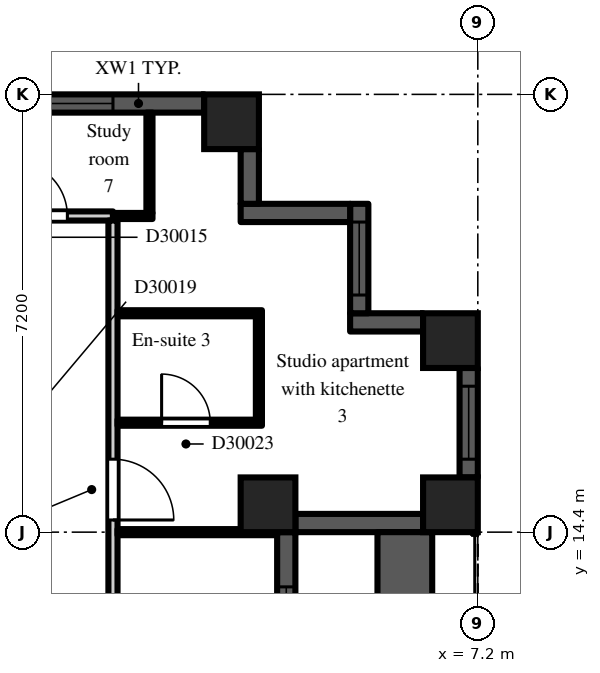
"""IFC4 building model, lengths in metres.
Left out: names, types, materials, properties, quantities, classifications, styles, units other than length and angle.
Written with IfcOpenShell. Run it as: python <this file> out.ifc"""

import sys

from ifc_helpers import new_model, si_unit, direction, frame, frame_2d, origin, origin_2d, place, context, subcontext, project, spatial, rectangle, extrude, element, fill, save


model = new_model("IFC4")
c1 = context("Model", 3, precision=1e-05, world=origin(), true_north=direction((0.0, 1.0)))
c2 = subcontext(c1, "Body", "Model", "MODEL_VIEW")
j1 = project(units=[si_unit("LENGTHUNIT", "METRE"), si_unit("PLANEANGLEUNIT", "RADIAN")], contexts=[c1])
p1 = place(None, origin())
s1 = spatial("IfcSite", under=j1, at=p1, CompositionType="ELEMENT")
p2 = place(p1, origin())
s2 = spatial("IfcBuilding", under=s1, at=p2, CompositionType="ELEMENT")
p3 = place(p2, frame((0.0, 0.0, 207.9)))
s3 = spatial("IfcBuildingStorey", under=s2, at=p3, CompositionType="ELEMENT", Elevation=207.9)
for number, where, z_axis, x_axis in (
    (1, (3.15, 21.15, 0.0), (0.0, 0.0, 1.0), (1.0, 0.0, 0.0)),
    (2, (3.75, 14.85, 0.0), (0.0, 0.0, 1.0), (1.0, 0.0, 0.0)),
    (3, (6.75, 14.85, 0.0), (0.0, 0.0, 1.0), (1.0, 0.0, 0.0)),
    (4, (6.75, 17.55, 0.0), (0.0, 0.0, 1.0), (1.0, 0.0, 0.0)),
):
    element("IfcColumn", number, at=place(p3, frame(where, z_axis=z_axis, x_axis=x_axis)), inside=s3, PredefinedType="COLUMN", context=c2, shape_type="SweptSolid", body=[
        extrude(rectangle(XDim=0.9, YDim=0.9, at=origin_2d()), origin(), (0.0, 0.0, 1.0), 3.0),
    ])
p4 = place(p3, frame((4.05, 7.2, 0.0), z_axis=(0.0, 0.0, 1.0), x_axis=(0.0, 1.0, 0.0)))
e5 = element("IfcWall", 5, at=p4, inside=s3, PredefinedType="SOLIDWALL", context=c2, shape_type="SweptSolid", body=[
    extrude(rectangle(XDim=7.2, YDim=0.3, at=frame_2d((3.6, 0.0))), origin(), (0.0, 0.0, 1.0), 2.3),
])
p5 = place(p4, frame((3.0, 0.0, 0.0)))
e6 = element("IfcOpeningElement", 6, at=p5, cuts=e5, PredefinedType="OPENING", context=c2, shape_type="SweptSolid", body=[
    extrude(rectangle(XDim=1.2, YDim=2.05, at=frame_2d((0.6, 1.025))), frame((0.0, 0.16, 0.0), z_axis=(0.0, -1.0, 0.0), x_axis=(1.0, 0.0, 0.0)), (0.0, 0.0, 1.0), 0.32),
])
p6 = place(p4, frame((0.9, 0.0, 0.2)))
e7 = element("IfcOpeningElement", 7, at=p6, cuts=e5, PredefinedType="OPENING", context=c2, shape_type="SweptSolid", body=[
    extrude(rectangle(XDim=1.8, YDim=1.85, at=frame_2d((0.9, 0.925))), frame((0.0, 0.16, 0.0), z_axis=(0.0, -1.0, 0.0), x_axis=(1.0, 0.0, 0.0)), (0.0, 0.0, 1.0), 0.32),
])
p7 = place(p4, frame((4.5, 0.0, 0.2)))
e8 = element("IfcOpeningElement", 8, at=p7, cuts=e5, PredefinedType="OPENING", context=c2, shape_type="SweptSolid", body=[
    extrude(rectangle(XDim=1.8, YDim=1.85, at=frame_2d((0.9, 0.925))), frame((0.0, 0.16, 0.0), z_axis=(0.0, -1.0, 0.0), x_axis=(1.0, 0.0, 0.0)), (0.0, 0.0, 1.0), 0.32),
])
p8 = place(p3, frame((4.2, 14.55, 0.0), z_axis=(0.0, 0.0, 1.0), x_axis=(1.0, 0.0, 0.0)))
e9 = element("IfcWall", 9, at=p8, inside=s3, PredefinedType="SOLIDWALL", context=c2, shape_type="SweptSolid", body=[
    extrude(rectangle(XDim=2.1, YDim=0.3, at=frame_2d((1.05, 0.0))), origin(), (0.0, 0.0, 1.0), 2.3),
])
p9 = place(p3, frame((7.05, 15.3, 0.0), z_axis=(0.0, 0.0, 1.0), x_axis=(0.0, 1.0, 0.0)))
e10 = element("IfcWall", 10, at=p9, inside=s3, PredefinedType="SOLIDWALL", context=c2, shape_type="SweptSolid", body=[
    extrude(rectangle(XDim=1.8, YDim=0.3, at=frame_2d((0.9, 0.0))), origin(), (0.0, 0.0, 1.0), 2.3),
])
p10 = place(p9, frame((0.3, 0.0, 0.2)))
e11 = element("IfcOpeningElement", 11, at=p10, cuts=e10, PredefinedType="OPENING", context=c2, shape_type="SweptSolid", body=[
    extrude(rectangle(XDim=1.2, YDim=1.85, at=frame_2d((0.6, 0.925))), frame((0.0, 0.16, 0.0), z_axis=(0.0, -1.0, 0.0), x_axis=(1.0, 0.0, 0.0)), (0.0, 0.0, 1.0), 0.32),
])
p11 = place(p3, frame((6.3, 17.85, 0.0), z_axis=(0.0, 0.0, 1.0), x_axis=(-1.0, 0.0, 0.0)))
e12 = element("IfcWall", 12, at=p11, inside=s3, PredefinedType="SOLIDWALL", context=c2, shape_type="SweptSolid", body=[
    extrude(rectangle(XDim=1.2, YDim=0.3, at=frame_2d((0.6, 0.0))), origin(), (0.0, 0.0, 1.0), 2.6),
])
p12 = place(p3, frame((5.25, 18.0, 0.0), z_axis=(0.0, 0.0, 1.0), x_axis=(0.0, 1.0, 0.0)))
e13 = element("IfcWall", 13, at=p12, inside=s3, PredefinedType="SOLIDWALL", context=c2, shape_type="SweptSolid", body=[
    extrude(rectangle(XDim=1.8, YDim=0.3, at=frame_2d((0.9, 0.0))), origin(), (0.0, 0.0, 1.0), 2.6),
])
p13 = place(p12, frame((0.3, 0.0, 0.2)))
e14 = element("IfcOpeningElement", 14, at=p13, cuts=e13, PredefinedType="OPENING", context=c2, shape_type="SweptSolid", body=[
    extrude(rectangle(XDim=1.2, YDim=1.85, at=frame_2d((0.6, 0.925))), frame((0.0, 0.16, 0.0), z_axis=(0.0, -1.0, 0.0), x_axis=(1.0, 0.0, 0.0)), (0.0, 0.0, 1.0), 0.32),
])
p14 = place(p3, frame((5.1, 19.65, 0.0), z_axis=(0.0, 0.0, 1.0), x_axis=(-1.0, 0.0, 0.0)))
e15 = element("IfcWall", 15, at=p14, inside=s3, PredefinedType="SOLIDWALL", context=c2, shape_type="SweptSolid", body=[
    extrude(rectangle(XDim=1.8, YDim=0.3, at=frame_2d((0.9, 0.0))), origin(), (0.0, 0.0, 1.0), 2.6),
])
p15 = place(p3, frame((3.45, 19.8, 0.0), z_axis=(0.0, 0.0, 1.0), x_axis=(0.0, 1.0, 0.0)))
e16 = element("IfcWall", 16, at=p15, inside=s3, PredefinedType="SOLIDWALL", context=c2, shape_type="SweptSolid", body=[
    extrude(rectangle(XDim=0.9, YDim=0.3, at=frame_2d((0.45, 0.0))), origin(), (0.0, 0.0, 1.0), 2.6),
])
p16 = place(p3, frame((2.7, 21.45, 0.0), z_axis=(0.0, 0.0, 1.0), x_axis=(-1.0, 0.0, 0.0)))
e17 = element("IfcWall", 17, at=p16, inside=s3, PredefinedType="SOLIDWALL", context=c2, shape_type="SweptSolid", body=[
    extrude(rectangle(XDim=5.4, YDim=0.3, at=frame_2d((2.7, 0.0))), origin(), (0.0, 0.0, 1.0), 2.3),
])
p17 = place(p16, frame((1.5, 0.0, 0.2)))
e18 = element("IfcOpeningElement", 18, at=p17, cuts=e17, PredefinedType="OPENING", context=c2, shape_type="SweptSolid", body=[
    extrude(rectangle(XDim=2.4, YDim=1.85, at=frame_2d((1.2, 0.925))), frame((0.0, 0.16, 0.0), z_axis=(0.0, -1.0, 0.0), x_axis=(1.0, 0.0, 0.0)), (0.0, 0.0, 1.0), 0.32),
])
p18 = place(p3, frame((6.0, 7.2, 0.0), z_axis=(0.0, 0.0, 1.0), x_axis=(0.0, 1.0, 0.0)))
e19 = element("IfcWall", 19, at=p18, inside=s3, PredefinedType="PARAPET", context=c2, shape_type="SweptSolid", body=[
    extrude(rectangle(XDim=7.2, YDim=0.9, at=frame_2d((3.6, 0.0))), origin(), (0.0, 0.0, 1.0), 0.8),
])
p19 = place(p3, frame((-1.2, 19.6, 0.0), z_axis=(0.0, 0.0, 1.0), x_axis=(1.0, 0.0, 0.0)))
e20 = element("IfcWall", 20, at=p19, inside=s3, PredefinedType="PARTITIONING", context=c2, shape_type="SweptSolid", body=[
    extrude(rectangle(XDim=2.4, YDim=0.15, at=frame_2d((1.2, 0.0))), origin(), (0.0, 0.0, 1.0), 2.6),
])
p20 = place(p19, frame((0.75, 0.0, 0.0)))
e21 = element("IfcOpeningElement", 21, at=p20, cuts=e20, PredefinedType="OPENING", context=c2, shape_type="SweptSolid", body=[
    extrude(rectangle(XDim=0.9, YDim=2.1, at=frame_2d((0.45, 1.05))), frame((0.0, 0.085, 0.0), z_axis=(0.0, -1.0, 0.0), x_axis=(1.0, 0.0, 0.0)), (0.0, 0.0, 1.0), 0.17),
])
p21 = place(p3, frame((1.2, 1.125, 0.0), z_axis=(0.0, 0.0, 1.0), x_axis=(0.0, 1.0, 0.0)))
e22 = element("IfcWall", 22, at=p21, inside=s3, PredefinedType="PARTITIONING", context=c2, shape_type="SweptSolid", body=[
    extrude(rectangle(XDim=18.4, YDim=0.15, at=frame_2d((9.2, 0.0))), origin(), (0.0, 0.0, 1.0), 2.6),
])
p22 = place(p21, frame((2.625, 0.0, 0.0)))
e23 = element("IfcOpeningElement", 23, at=p22, cuts=e22, PredefinedType="OPENING", context=c2, shape_type="SweptSolid", body=[
    extrude(rectangle(XDim=0.9, YDim=2.1, at=frame_2d((0.45, 1.05))), frame((0.0, 0.085, 0.0), z_axis=(0.0, -1.0, 0.0), x_axis=(1.0, 0.0, 0.0)), (0.0, 0.0, 1.0), 0.17),
])
p23 = place(p21, frame((7.025, 0.0, 0.0)))
e24 = element("IfcOpeningElement", 24, at=p23, cuts=e22, PredefinedType="OPENING", context=c2, shape_type="SweptSolid", body=[
    extrude(rectangle(XDim=0.9, YDim=2.1, at=frame_2d((0.45, 1.05))), frame((0.0, 0.085, 0.0), z_axis=(0.0, -1.0, 0.0), x_axis=(1.0, 0.0, 0.0)), (0.0, 0.0, 1.0), 0.17),
])
p24 = place(p21, frame((10.625, 0.0, 0.0)))
e25 = element("IfcOpeningElement", 25, at=p24, cuts=e22, PredefinedType="OPENING", context=c2, shape_type="SweptSolid", body=[
    extrude(rectangle(XDim=0.9, YDim=2.1, at=frame_2d((0.45, 1.05))), frame((0.0, 0.085, 0.0), z_axis=(0.0, -1.0, 0.0), x_axis=(1.0, 0.0, 0.0)), (0.0, 0.0, 1.0), 0.17),
])
p25 = place(p21, frame((13.475, 0.0, 0.0)))
e26 = element("IfcOpeningElement", 26, at=p25, cuts=e22, PredefinedType="OPENING", context=c2, shape_type="SweptSolid", body=[
    extrude(rectangle(XDim=1.0, YDim=2.1, at=frame_2d((0.5, 1.05))), frame((0.0, 0.085, 0.0), z_axis=(0.0, -1.0, 0.0), x_axis=(1.0, 0.0, 0.0)), (0.0, 0.0, 1.0), 0.17),
])
p26 = place(p3, frame((1.275, 14.4, 0.0), z_axis=(0.0, 0.0, 1.0), x_axis=(1.0, 0.0, 0.0)))
e27 = element("IfcWall", 27, at=p26, inside=s3, PredefinedType="PARTITIONING", context=c2, shape_type="SweptSolid", body=[
    extrude(rectangle(XDim=2.625, YDim=0.1, at=frame_2d((1.312, 0.0))), origin(), (0.0, 0.0, 1.0), 2.6),
])
p27 = place(p3, frame((1.275, 16.2, 0.0), z_axis=(0.0, 0.0, 1.0), x_axis=(1.0, 0.0, 0.0)))
e28 = element("IfcWall", 28, at=p27, inside=s3, PredefinedType="PARTITIONING", context=c2, shape_type="SweptSolid", body=[
    extrude(rectangle(XDim=2.375, YDim=0.1, at=frame_2d((1.188, 0.0))), origin(), (0.0, 0.0, 1.0), 2.6),
])
p28 = place(p27, frame((0.725, 0.0, 0.0)))
e29 = element("IfcOpeningElement", 29, at=p28, cuts=e28, PredefinedType="OPENING", context=c2, shape_type="SweptSolid", body=[
    extrude(rectangle(XDim=0.8, YDim=2.1, at=frame_2d((0.4, 1.05))), frame((0.0, 0.06, 0.0), z_axis=(0.0, -1.0, 0.0), x_axis=(1.0, 0.0, 0.0)), (0.0, 0.0, 1.0), 0.12),
])
p29 = place(p3, frame((1.275, 18.0, 0.0), z_axis=(0.0, 0.0, 1.0), x_axis=(1.0, 0.0, 0.0)))
e30 = element("IfcWall", 30, at=p29, inside=s3, PredefinedType="PARTITIONING", context=c2, shape_type="SweptSolid", body=[
    extrude(rectangle(XDim=2.375, YDim=0.1, at=frame_2d((1.188, 0.0))), origin(), (0.0, 0.0, 1.0), 2.6),
])
p30 = place(p3, frame((1.2, 19.6, 0.0), z_axis=(0.0, 0.0, 1.0), x_axis=(1.0, 0.0, 0.0)))
e31 = element("IfcWall", 31, at=p30, inside=s3, PredefinedType="PARTITIONING", context=c2, shape_type="SweptSolid", body=[
    extrude(rectangle(XDim=0.65, YDim=0.1, at=frame_2d((0.325, 0.0))), origin(), (0.0, 0.0, 1.0), 2.6),
])
p31 = place(p3, frame((1.8, 19.65, 0.0), z_axis=(0.0, 0.0, 1.0), x_axis=(0.0, 1.0, 0.0)))
e32 = element("IfcWall", 32, at=p31, inside=s3, PredefinedType="PARTITIONING", context=c2, shape_type="SweptSolid", body=[
    extrude(rectangle(XDim=1.65, YDim=0.1, at=frame_2d((0.825, 0.0))), origin(), (0.0, 0.0, 1.0), 2.6),
])
p32 = place(p3, frame((3.6, 16.25, 0.0), z_axis=(0.0, 0.0, 1.0), x_axis=(0.0, 1.0, 0.0)))
e33 = element("IfcWall", 33, at=p32, inside=s3, PredefinedType="PARTITIONING", context=c2, shape_type="SweptSolid", body=[
    extrude(rectangle(XDim=1.7, YDim=0.1, at=frame_2d((0.85, 0.0))), origin(), (0.0, 0.0, 1.0), 2.6),
])
p33 = place(p7, origin())
e34 = element("IfcWindow", 34, at=p33, inside=s3, PartitioningType="SINGLE_PANEL", PredefinedType="WINDOW", context=c2, shape_type="SweptSolid", body=[
    extrude(rectangle(XDim=1.8, YDim=1.85, at=frame_2d((0.9, 0.925))), frame((0.0, 0.03, 0.0), z_axis=(0.0, -1.0, 0.0), x_axis=(1.0, 0.0, 0.0)), (0.0, 0.0, 1.0), 0.06),
])
fill(e8, e34)
p34 = place(p10, origin())
e35 = element("IfcWindow", 35, at=p34, inside=s3, PartitioningType="SINGLE_PANEL", PredefinedType="WINDOW", context=c2, shape_type="SweptSolid", body=[
    extrude(rectangle(XDim=1.2, YDim=1.85, at=frame_2d((0.6, 0.925))), frame((0.0, 0.03, 0.0), z_axis=(0.0, -1.0, 0.0), x_axis=(1.0, 0.0, 0.0)), (0.0, 0.0, 1.0), 0.06),
])
fill(e11, e35)
p35 = place(p13, origin())
e36 = element("IfcWindow", 36, at=p35, inside=s3, PartitioningType="SINGLE_PANEL", PredefinedType="WINDOW", context=c2, shape_type="SweptSolid", body=[
    extrude(rectangle(XDim=1.2, YDim=1.85, at=frame_2d((0.6, 0.925))), frame((0.0, 0.03, 0.0), z_axis=(0.0, -1.0, 0.0), x_axis=(1.0, 0.0, 0.0)), (0.0, 0.0, 1.0), 0.06),
])
fill(e14, e36)
p36 = place(p17, origin())
e37 = element("IfcWindow", 37, at=p36, inside=s3, PartitioningType="SINGLE_PANEL", PredefinedType="WINDOW", context=c2, shape_type="SweptSolid", body=[
    extrude(rectangle(XDim=2.4, YDim=1.85, at=frame_2d((1.2, 0.925))), frame((0.0, 0.03, 0.0), z_axis=(0.0, -1.0, 0.0), x_axis=(1.0, 0.0, 0.0)), (0.0, 0.0, 1.0), 0.06),
])
fill(e18, e37)
p37 = place(p20, origin())
e38 = element("IfcDoor", 38, at=p37, inside=s3, OperationType="SINGLE_SWING_LEFT", PredefinedType="DOOR", context=c2, shape_type="SweptSolid", body=[
    extrude(rectangle(XDim=0.9, YDim=2.1, at=frame_2d((0.45, 1.05))), frame((0.0, 0.025, 0.0), z_axis=(0.0, -1.0, 0.0), x_axis=(1.0, 0.0, 0.0)), (0.0, 0.0, 1.0), 0.05),
])
fill(e21, e38)
p38 = place(p28, origin())
e39 = element("IfcDoor", 39, at=p38, inside=s3, OperationType="SINGLE_SWING_LEFT", PredefinedType="DOOR", context=c2, shape_type="SweptSolid", body=[
    extrude(rectangle(XDim=0.8, YDim=2.1, at=frame_2d((0.4, 1.05))), frame((0.0, 0.025, 0.0), z_axis=(0.0, -1.0, 0.0), x_axis=(1.0, 0.0, 0.0)), (0.0, 0.0, 1.0), 0.05),
])
fill(e29, e39)
p39 = place(p25, frame((1.0, 0.0, 0.0), z_axis=(0.0, 0.0, 1.0), x_axis=(-1.0, 0.0, 0.0)))
e40 = element("IfcDoor", 40, at=p39, inside=s3, OperationType="SINGLE_SWING_RIGHT", PredefinedType="DOOR", context=c2, shape_type="SweptSolid", body=[
    extrude(rectangle(XDim=1.0, YDim=2.1, at=frame_2d((0.5, 1.05))), frame((0.0, 0.025, 0.0), z_axis=(0.0, -1.0, 0.0), x_axis=(1.0, 0.0, 0.0)), (0.0, 0.0, 1.0), 0.05),
])
fill(e26, e40)
save(model, sys.argv[1])
